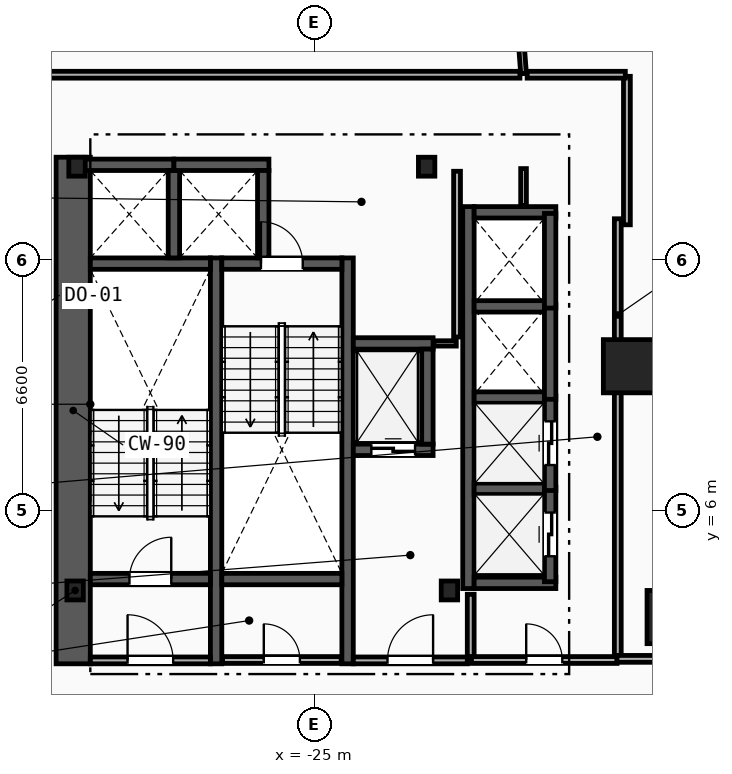
"""IFC4 building model, lengths in metres.
Left out: names, types, materials, properties, quantities, classifications, styles, units other than length and angle.
Written with IfcOpenShell. Run it as: python <this file> out.ifc"""

import sys

from ifc_helpers import new_model, si_unit, direction, frame, frame_2d, origin, origin_2d, place, context, subcontext, project, spatial, rectangle, i_section, extrude, element, fill, save


model = new_model("IFC4")
c1 = context("Model", 3, precision=1e-05, world=origin(), true_north=direction((0.0, 1.0)))
c2 = subcontext(c1, "Body", "Model", "MODEL_VIEW")
j1 = project(units=[si_unit("LENGTHUNIT", "METRE"), si_unit("PLANEANGLEUNIT", "RADIAN")], contexts=[c1])
p1 = place(None, origin())
s1 = spatial("IfcSite", under=j1, at=p1, CompositionType="ELEMENT")
p2 = place(p1, origin())
s2 = spatial("IfcBuilding", under=s1, at=p2, CompositionType="ELEMENT")
p3 = place(p2, frame((0.0, 0.0, 20.0)))
s3 = spatial("IfcBuildingStorey", under=s2, at=p3, CompositionType="ELEMENT", Elevation=20.0)
for number, where, z_axis, x_axis in (
    (1, (-31.3, 3.9, 0.0), (0.0, 0.0, 1.0), (1.0, 0.0, 0.0)),
    (2, (-21.45, 3.9, 0.0), (0.0, 0.0, 1.0), (1.0, 0.0, 0.0)),
    (3, (-22.05, 15.05, 0.0), (0.0, 0.0, 1.0), (1.0, 0.0, 0.0)),
    (4, (-31.25, 15.05, 0.0), (0.0, 0.0, 1.0), (1.0, 0.0, 0.0)),
):
    element("IfcColumn", number, at=place(p3, frame(where, z_axis=z_axis, x_axis=x_axis)), inside=s3, PredefinedType="COLUMN", context=c2, shape_type="SweptSolid", body=[
        extrude(i_section(OverallWidth=0.432, OverallDepth=0.498, WebThickness=0.056, FlangeThickness=0.089, FilletRadius=0.018, at=origin_2d()), origin(), (0.0, 0.0, 1.0), 4.0),
    ])
for number, where, z_axis, x_axis in (
    (5, (-15.55, 3.2, 0.0), (0.0, 0.0, 1.0), (1.0, 0.0, 0.0)),
    (6, (-16.7, 9.8, 0.0), (0.0, 0.0, 1.0), (1.0, 0.0, 0.0)),
):
    element("IfcColumn", number, at=place(p3, frame(where, z_axis=z_axis, x_axis=x_axis)), inside=s3, PredefinedType="COLUMN", context=c2, shape_type="SweptSolid", body=[
        extrude(rectangle(XDim=1.4, YDim=1.4, at=origin_2d()), origin(), (0.0, 0.0, 1.0), 4.0),
    ])
p4 = place(p3, frame((-31.35, 1.97, 0.0), z_axis=(0.0, 0.0, 1.0), x_axis=(0.0, 1.0, 0.0)))
e7 = element("IfcWall", 7, at=p4, inside=s3, PredefinedType="SHEAR", context=c2, shape_type="SweptSolid", body=[
    extrude(rectangle(XDim=13.33, YDim=0.9, at=frame_2d((6.665, 0.0))), origin(), (0.0, 0.0, 1.0), 3.7),
])
for number, where, z_axis, x_axis in (
    (8, (-27.59, 1.97, 0.0), (0.0, 0.0, 1.0), (0.0, 1.0, 0.0)),
    (9, (-24.13, 1.97, 0.0), (0.0, 0.0, 1.0), (0.0, 1.0, 0.0)),
):
    element("IfcWall", number, at=place(p3, frame(where, z_axis=z_axis, x_axis=x_axis)), inside=s3, PredefinedType="SHEAR", context=c2, shape_type="SweptSolid", body=[
        extrude(rectangle(XDim=10.68, YDim=0.3, at=frame_2d((5.34, 0.0))), origin(), (0.0, 0.0, 1.0), 3.7),
    ])
p5 = place(p3, frame((-30.9, 4.2, 0.0), z_axis=(0.0, 0.0, 1.0), x_axis=(1.0, 0.0, 0.0)))
e10 = element("IfcWall", 10, at=p5, inside=s3, PredefinedType="SHEAR", context=c2, shape_type="SweptSolid", body=[
    extrude(rectangle(XDim=3.16, YDim=0.3, at=frame_2d((1.58, 0.0))), origin(), (0.0, 0.0, 1.0), 3.7),
])
p6 = place(p5, frame((1.03, 0.0, 0.0)))
e11 = element("IfcOpeningElement", 11, at=p6, cuts=e10, PredefinedType="OPENING", context=c2, shape_type="SweptSolid", body=[
    extrude(rectangle(XDim=1.1, YDim=2.15, at=frame_2d((0.55, 1.075))), frame((0.0, 0.16, 0.0), z_axis=(0.0, -1.0, 0.0), x_axis=(1.0, 0.0, 0.0)), (0.0, 0.0, 1.0), 0.32),
])
p7 = place(p3, frame((-30.9, 12.5, 0.0), z_axis=(0.0, 0.0, 1.0), x_axis=(1.0, 0.0, 0.0)))
e12 = element("IfcWall", 12, at=p7, inside=s3, PredefinedType="SHEAR", context=c2, shape_type="SweptSolid", body=[
    extrude(rectangle(XDim=3.16, YDim=0.3, at=frame_2d((1.58, 0.0))), origin(), (0.0, 0.0, 1.0), 3.7),
])
p8 = place(p3, frame((-27.44, 12.5, 0.0), z_axis=(0.0, 0.0, 1.0), x_axis=(1.0, 0.0, 0.0)))
e13 = element("IfcWall", 13, at=p8, inside=s3, PredefinedType="SHEAR", context=c2, shape_type="SweptSolid", body=[
    extrude(rectangle(XDim=3.16, YDim=0.3, at=frame_2d((1.58, 0.0))), origin(), (0.0, 0.0, 1.0), 3.7),
])
p9 = place(p8, frame((1.03, 0.0, 0.0)))
e14 = element("IfcOpeningElement", 14, at=p9, cuts=e13, PredefinedType="OPENING", context=c2, shape_type="SweptSolid", body=[
    extrude(rectangle(XDim=1.1, YDim=2.15, at=frame_2d((0.55, 1.075))), frame((0.0, 0.16, 0.0), z_axis=(0.0, -1.0, 0.0), x_axis=(1.0, 0.0, 0.0)), (0.0, 0.0, 1.0), 0.32),
])
p10 = place(p3, frame((-27.44, 4.2, 0.0), z_axis=(0.0, 0.0, 1.0), x_axis=(1.0, 0.0, 0.0)))
e15 = element("IfcWall", 15, at=p10, inside=s3, PredefinedType="SHEAR", context=c2, shape_type="SweptSolid", body=[
    extrude(rectangle(XDim=3.16, YDim=0.3, at=frame_2d((1.58, 0.0))), origin(), (0.0, 0.0, 1.0), 3.7),
])
p11 = place(p3, frame((-20.89, 2.15, 0.0), z_axis=(0.0, 0.0, 1.0), x_axis=(0.0, 1.0, 0.0)))
e16 = element("IfcWall", 16, at=p11, inside=s3, PredefinedType="PARTITIONING", context=c2, shape_type="SweptSolid", body=[
    extrude(rectangle(XDim=1.65, YDim=0.18, at=frame_2d((0.825, 0.0))), origin(), (0.0, 0.0, 1.0), 3.7),
])
p12 = place(p3, frame((-23.98, 2.06, 0.0), z_axis=(0.0, 0.0, 1.0), x_axis=(1.0, 0.0, 0.0)))
e17 = element("IfcWall", 17, at=p12, inside=s3, PredefinedType="PARTITIONING", context=c2, shape_type="SweptSolid", body=[
    extrude(rectangle(XDim=3.0, YDim=0.18, at=frame_2d((1.5, 0.0))), origin(), (0.0, 0.0, 1.0), 3.7),
])
p13 = place(p12, frame((0.9, 0.0, 0.0)))
e18 = element("IfcOpeningElement", 18, at=p13, cuts=e17, PredefinedType="OPENING", context=c2, shape_type="SweptSolid", body=[
    extrude(rectangle(XDim=1.2, YDim=2.15, at=frame_2d((0.6, 1.075))), frame((0.0, 0.1, 0.0), z_axis=(0.0, -1.0, 0.0), x_axis=(1.0, 0.0, 0.0)), (0.0, 0.0, 1.0), 0.2),
])
p14 = place(p3, frame((-30.9, 2.06, 0.0), z_axis=(0.0, 0.0, 1.0), x_axis=(1.0, 0.0, 0.0)))
e19 = element("IfcWall", 19, at=p14, inside=s3, PredefinedType="PARTITIONING", context=c2, shape_type="SweptSolid", body=[
    extrude(rectangle(XDim=3.16, YDim=0.18, at=frame_2d((1.58, 0.0))), origin(), (0.0, 0.0, 1.0), 3.7),
])
p15 = place(p14, frame((0.98, 0.0, 0.0)))
e20 = element("IfcOpeningElement", 20, at=p15, cuts=e19, PredefinedType="OPENING", context=c2, shape_type="SweptSolid", body=[
    extrude(rectangle(XDim=1.2, YDim=2.15, at=frame_2d((0.6, 1.075))), frame((0.0, 0.1, 0.0), z_axis=(0.0, -1.0, 0.0), x_axis=(1.0, 0.0, 0.0)), (0.0, 0.0, 1.0), 0.2),
])
p16 = place(p3, frame((-23.98, 7.6, 0.0), z_axis=(0.0, 0.0, 1.0), x_axis=(1.0, 0.0, 0.0)))
e21 = element("IfcWall", 21, at=p16, inside=s3, PredefinedType="SHEAR", context=c2, shape_type="SweptSolid", body=[
    extrude(rectangle(XDim=2.1, YDim=0.3, at=frame_2d((1.05, 0.0))), origin(), (0.0, 0.0, 1.0), 3.7),
])
p17 = place(p16, frame((0.475, 0.0, 0.0)))
e22 = element("IfcOpeningElement", 22, at=p17, cuts=e21, PredefinedType="OPENING", context=c2, shape_type="SweptSolid", body=[
    extrude(rectangle(XDim=1.15, YDim=2.2, at=frame_2d((0.575, 1.1))), frame((0.0, 0.16, 0.0), z_axis=(0.0, -1.0, 0.0), x_axis=(1.0, 0.0, 0.0)), (0.0, 0.0, 1.0), 0.32),
])
p18 = place(p3, frame((-23.98, 10.4, 0.0), z_axis=(0.0, 0.0, 1.0), x_axis=(1.0, 0.0, 0.0)))
e23 = element("IfcWall", 23, at=p18, inside=s3, PredefinedType="SHEAR", context=c2, shape_type="SweptSolid", body=[
    extrude(rectangle(XDim=2.1, YDim=0.3, at=frame_2d((1.05, 0.0))), origin(), (0.0, 0.0, 1.0), 3.7),
])
for number, where, z_axis, x_axis in (
    (24, (-22.03, 7.75, 0.0), (0.0, 0.0, 1.0), (0.0, 1.0, 0.0)),
    (25, (-31.2, 15.1, 0.0), (0.0, 0.0, 1.0), (1.0, 0.0, 0.0)),
):
    element("IfcWall", number, at=place(p3, frame(where, z_axis=z_axis, x_axis=x_axis)), inside=s3, PredefinedType="SHEAR", context=c2, shape_type="SweptSolid", body=[
        extrude(rectangle(XDim=2.5, YDim=0.3, at=frame_2d((1.25, 0.0))), origin(), (0.0, 0.0, 1.0), 3.7),
    ])
p19 = place(p3, frame((-28.7, 12.65, 0.0), z_axis=(0.0, 0.0, 1.0), x_axis=(0.0, 1.0, 0.0)))
e26 = element("IfcWall", 26, at=p19, inside=s3, PredefinedType="SHEAR", context=c2, shape_type="SweptSolid", body=[
    extrude(rectangle(XDim=2.3, YDim=0.3, at=frame_2d((1.15, 0.0))), origin(), (0.0, 0.0, 1.0), 3.7),
])
p20 = place(p3, frame((-28.7, 15.1, 0.0), z_axis=(0.0, 0.0, 1.0), x_axis=(1.0, 0.0, 0.0)))
e27 = element("IfcWall", 27, at=p20, inside=s3, PredefinedType="SHEAR", context=c2, shape_type="SweptSolid", body=[
    extrude(rectangle(XDim=2.5, YDim=0.3, at=frame_2d((1.25, 0.0))), origin(), (0.0, 0.0, 1.0), 3.7),
])
p21 = place(p3, frame((-26.35, 12.65, 0.0), z_axis=(0.0, 0.0, 1.0), x_axis=(0.0, 1.0, 0.0)))
e28 = element("IfcWall", 28, at=p21, inside=s3, PredefinedType="SHEAR", context=c2, shape_type="SweptSolid", body=[
    extrude(rectangle(XDim=2.3, YDim=0.3, at=frame_2d((1.15, 0.0))), origin(), (0.0, 0.0, 1.0), 3.7),
])
p22 = place(p3, frame((-20.95, 3.95, 0.0), z_axis=(0.0, 0.0, 1.0), x_axis=(0.0, 1.0, 0.0)))
e29 = element("IfcWall", 29, at=p22, inside=s3, PredefinedType="SHEAR", context=c2, shape_type="SweptSolid", body=[
    extrude(rectangle(XDim=10.05, YDim=0.3, at=frame_2d((5.025, 0.0))), origin(), (0.0, 0.0, 1.0), 3.7),
])
for number, where, z_axis, x_axis in (
    (30, (-20.8, 4.1, 0.0), (0.0, 0.0, 1.0), (1.0, 0.0, 0.0)),
    (31, (-20.8, 13.85, 0.0), (0.0, 0.0, 1.0), (1.0, 0.0, 0.0)),
):
    element("IfcWall", number, at=place(p3, frame(where, z_axis=z_axis, x_axis=x_axis)), inside=s3, PredefinedType="SHEAR", context=c2, shape_type="SweptSolid", body=[
        extrude(rectangle(XDim=2.15, YDim=0.3, at=frame_2d((1.075, 0.0))), origin(), (0.0, 0.0, 1.0), 3.7),
    ])
for number, where, z_axis, x_axis in (
    (32, (-20.8, 6.575, 0.0), (0.0, 0.0, 1.0), (1.0, 0.0, 0.0)),
    (33, (-20.8, 8.975, 0.0), (0.0, 0.0, 1.0), (1.0, 0.0, 0.0)),
    (34, (-20.8, 11.375, 0.0), (0.0, 0.0, 1.0), (1.0, 0.0, 0.0)),
):
    element("IfcWall", number, at=place(p3, frame(where, z_axis=z_axis, x_axis=x_axis)), inside=s3, PredefinedType="SHEAR", context=c2, shape_type="SweptSolid", body=[
        extrude(rectangle(XDim=1.85, YDim=0.3, at=frame_2d((0.925, 0.0))), origin(), (0.0, 0.0, 1.0), 3.7),
    ])
p23 = place(p3, frame((-18.8, 4.13, 0.0), z_axis=(0.0, 0.0, 1.0), x_axis=(0.0, 1.0, 0.0)))
e35 = element("IfcWall", 35, at=p23, inside=s3, PredefinedType="SHEAR", context=c2, shape_type="SweptSolid", body=[
    extrude(rectangle(XDim=2.49, YDim=0.3, at=frame_2d((1.245, 0.0))), origin(), (0.0, 0.0, 1.0), 3.7),
])
p24 = place(p23, frame((0.67, 0.0, 0.0)))
e36 = element("IfcOpeningElement", 36, at=p24, cuts=e35, PredefinedType="OPENING", context=c2, shape_type="SweptSolid", body=[
    extrude(rectangle(XDim=1.15, YDim=2.2, at=frame_2d((0.575, 1.1))), frame((0.0, 0.16, 0.0), z_axis=(0.0, -1.0, 0.0), x_axis=(1.0, 0.0, 0.0)), (0.0, 0.0, 1.0), 0.32),
])
p25 = place(p3, frame((-18.8, 6.53, 0.0), z_axis=(0.0, 0.0, 1.0), x_axis=(0.0, 1.0, 0.0)))
e37 = element("IfcWall", 37, at=p25, inside=s3, PredefinedType="SHEAR", context=c2, shape_type="SweptSolid", body=[
    extrude(rectangle(XDim=2.49, YDim=0.3, at=frame_2d((1.245, 0.0))), origin(), (0.0, 0.0, 1.0), 3.7),
])
p26 = place(p25, frame((0.67, 0.0, 0.0)))
e38 = element("IfcOpeningElement", 38, at=p26, cuts=e37, PredefinedType="OPENING", context=c2, shape_type="SweptSolid", body=[
    extrude(rectangle(XDim=1.15, YDim=2.2, at=frame_2d((0.575, 1.1))), frame((0.0, 0.16, 0.0), z_axis=(0.0, -1.0, 0.0), x_axis=(1.0, 0.0, 0.0)), (0.0, 0.0, 1.0), 0.32),
])
for number, where, z_axis, x_axis in (
    (39, (-18.8, 8.93, 0.0), (0.0, 0.0, 1.0), (0.0, 1.0, 0.0)),
    (40, (-18.8, 11.33, 0.0), (0.0, 0.0, 1.0), (0.0, 1.0, 0.0)),
):
    element("IfcWall", number, at=place(p3, frame(where, z_axis=z_axis, x_axis=x_axis)), inside=s3, PredefinedType="SHEAR", context=c2, shape_type="SweptSolid", body=[
        extrude(rectangle(XDim=2.49, YDim=0.3, at=frame_2d((1.245, 0.0))), origin(), (0.0, 0.0, 1.0), 3.7),
    ])
p27 = place(p3, frame((-17.02, 2.17, 0.0), z_axis=(0.0, 0.0, 1.0), x_axis=(0.0, 1.0, 0.0)))
e41 = element("IfcWall", 41, at=p27, inside=s3, PredefinedType="PARTITIONING", context=c2, shape_type="SweptSolid", body=[
    extrude(rectangle(XDim=11.51, YDim=0.18, at=frame_2d((5.755, 0.0))), origin(), (0.0, 0.0, 1.0), 1.9),
])
p28 = place(p3, frame((-20.87, 2.07, 0.0), z_axis=(0.0, 0.0, 1.0), x_axis=(1.0, 0.0, 0.0)))
e42 = element("IfcWall", 42, at=p28, inside=s3, PredefinedType="PARTITIONING", context=c2, shape_type="SweptSolid", body=[
    extrude(rectangle(XDim=3.83, YDim=0.18, at=frame_2d((1.915, 0.0))), origin(), (0.0, 0.0, 1.0), 3.7),
])
p29 = place(p28, frame((1.44, 0.0, 0.0)))
e43 = element("IfcOpeningElement", 43, at=p29, cuts=e42, PredefinedType="OPENING", context=c2, shape_type="SweptSolid", body=[
    extrude(rectangle(XDim=0.95, YDim=2.1, at=frame_2d((0.475, 1.05))), frame((0.0, 0.1, 0.0), z_axis=(0.0, -1.0, 0.0), x_axis=(1.0, 0.0, 0.0)), (0.0, 0.0, 1.0), 0.2),
])
p30 = place(p3, frame((-21.86, 10.4, 0.0), z_axis=(0.0, 0.0, 1.0), x_axis=(1.0, 0.0, 0.0)))
e44 = element("IfcWall", 44, at=p30, inside=s3, PredefinedType="PARTITIONING", context=c2, shape_type="SweptSolid", body=[
    extrude(rectangle(XDim=0.59, YDim=0.14, at=frame_2d((0.295, 0.0))), origin(), (0.0, 0.0, 1.0), 3.7),
])
p31 = place(p3, frame((-21.25, 10.57, 0.0), z_axis=(0.0, 0.0, 1.0), x_axis=(0.0, 1.0, 0.0)))
e45 = element("IfcWall", 45, at=p31, inside=s3, PredefinedType="PARTITIONING", context=c2, shape_type="SweptSolid", body=[
    extrude(rectangle(XDim=4.36, YDim=0.18, at=frame_2d((2.18, 0.0))), origin(), (0.0, 0.0, 1.0), 3.7),
])
p32 = place(p3, frame((-27.42, 2.07, 0.0), z_axis=(0.0, 0.0, 1.0), x_axis=(1.0, 0.0, 0.0)))
e46 = element("IfcWall", 46, at=p32, inside=s3, PredefinedType="PARTITIONING", context=c2, shape_type="SweptSolid", body=[
    extrude(rectangle(XDim=3.12, YDim=0.18, at=frame_2d((1.56, 0.0))), origin(), (0.0, 0.0, 1.0), 3.7),
])
p33 = place(p32, frame((1.085, 0.0, 0.0)))
e47 = element("IfcOpeningElement", 47, at=p33, cuts=e46, PredefinedType="OPENING", context=c2, shape_type="SweptSolid", body=[
    extrude(rectangle(XDim=0.95, YDim=2.1, at=frame_2d((0.475, 1.05))), frame((0.0, 0.1, 0.0), z_axis=(0.0, -1.0, 0.0), x_axis=(1.0, 0.0, 0.0)), (0.0, 0.0, 1.0), 0.2),
])
p34 = place(p3, frame((-19.5, 14.03, 0.0), z_axis=(0.0, 0.0, 1.0), x_axis=(0.0, 1.0, 0.0)))
e48 = element("IfcWall", 48, at=p34, inside=s3, PredefinedType="PARTITIONING", context=c2, shape_type="SweptSolid", body=[
    extrude(rectangle(XDim=0.97, YDim=0.15, at=frame_2d((0.485, 0.0))), origin(), (0.0, 0.0, 1.0), 3.7),
])
p35 = place(p3, frame((-19.5, 17.5, 0.0), z_axis=(0.0, 0.0, 1.0), x_axis=(-0.074269014628, 0.997238243082, 0.0)))
e49 = element("IfcWall", 49, at=p35, inside=s3, PredefinedType="PARTITIONING", context=c2, shape_type="SweptSolid", body=[
    extrude(rectangle(XDim=10.637, YDim=0.15, at=frame_2d((5.319, 0.0))), origin(), (0.0, 0.0, 1.0), 3.7),
])
p36 = place(p35, frame((4.619, 0.0, 1.05)))
e50 = element("IfcOpeningElement", 50, at=p36, cuts=e49, PredefinedType="OPENING", context=c2, shape_type="SweptSolid", body=[
    extrude(rectangle(XDim=1.4, YDim=1.5, at=frame_2d((0.7, 0.75))), frame((0.0, 0.085, 0.0), z_axis=(0.0, -1.0, 0.0), x_axis=(1.0, 0.0, 0.0)), (0.0, 0.0, 1.0), 0.17),
])
p37 = place(p3, frame((-19.595, 17.47, 0.0), z_axis=(0.0, 0.0, 1.0), x_axis=(-1.0, 0.0, 0.0)))
e51 = element("IfcWall", 51, at=p37, inside=s3, PredefinedType="PARTITIONING", context=c2, shape_type="SweptSolid", body=[
    extrude(rectangle(XDim=14.033, YDim=0.18, at=frame_2d((7.017, 0.0))), origin(), (0.0, 0.0, 1.0), 1.9),
])
p38 = place(p3, frame((-0.095, 2.1, 0.0), z_axis=(0.0, 0.0, 1.0), x_axis=(-1.0, 0.0, 0.0)))
e52 = element("IfcWall", 52, at=p38, inside=s3, PredefinedType="PARTITIONING", context=c2, shape_type="SweptSolid", body=[
    extrude(rectangle(XDim=16.945, YDim=0.18, at=frame_2d((8.473, 0.0))), origin(), (0.0, 0.0, 1.0), 2.922),
])
p39 = place(p38, frame((7.673, 0.0, 0.0)))
e53 = element("IfcOpeningElement", 53, at=p39, cuts=e52, PredefinedType="OPENING", context=c2, shape_type="SweptSolid", body=[
    extrude(rectangle(XDim=1.6, YDim=2.2, at=frame_2d((0.8, 1.1))), frame((0.0, 0.1, 0.0), z_axis=(0.0, -1.0, 0.0), x_axis=(1.0, 0.0, 0.0)), (0.0, 0.0, 1.0), 0.2),
])
p40 = place(p3, frame((-16.78, 13.521, 0.0), z_axis=(0.0, 0.0, 1.0), x_axis=(0.0, 1.0, 0.0)))
e54 = element("IfcWall", 54, at=p40, inside=s3, PredefinedType="PARTITIONING", context=c2, shape_type="SweptSolid", body=[
    extrude(rectangle(XDim=3.907, YDim=0.18, at=frame_2d((1.954, 0.0))), origin(), (0.0, 0.0, 1.0), 3.7),
])
p41 = place(p3, frame((-16.822, 17.47, 0.0), z_axis=(0.0, 0.0, 1.0), x_axis=(-1.0, 0.0, 0.0)))
e55 = element("IfcWall", 55, at=p41, inside=s3, PredefinedType="PARTITIONING", context=c2, shape_type="SweptSolid", body=[
    extrude(rectangle(XDim=2.583, YDim=0.18, at=frame_2d((1.292, 0.0))), origin(), (0.0, 0.0, 1.0), 3.7),
])
p42 = place(p6, origin())
e56 = element("IfcDoor", 56, at=p42, inside=s3, OperationType="SINGLE_SWING_RIGHT", PredefinedType="DOOR", context=c2, shape_type="SweptSolid", body=[
    extrude(rectangle(XDim=1.1, YDim=2.15, at=frame_2d((0.55, 1.075))), frame((0.0, 0.025, 0.0), z_axis=(0.0, -1.0, 0.0), x_axis=(1.0, 0.0, 0.0)), (0.0, 0.0, 1.0), 0.05),
])
fill(e11, e56)
p43 = place(p9, origin())
e57 = element("IfcDoor", 57, at=p43, inside=s3, OperationType="SINGLE_SWING_LEFT", PredefinedType="DOOR", context=c2, shape_type="SweptSolid", body=[
    extrude(rectangle(XDim=1.1, YDim=2.15, at=frame_2d((0.55, 1.075))), frame((0.0, 0.025, 0.0), z_axis=(0.0, -1.0, 0.0), x_axis=(1.0, 0.0, 0.0)), (0.0, 0.0, 1.0), 0.05),
])
fill(e14, e57)
p44 = place(p13, origin())
e58 = element("IfcDoor", 58, at=p44, inside=s3, OperationType="SINGLE_SWING_RIGHT", PredefinedType="DOOR", context=c2, shape_type="SweptSolid", body=[
    extrude(rectangle(XDim=1.2, YDim=2.15, at=frame_2d((0.6, 1.075))), frame((0.0, 0.025, 0.0), z_axis=(0.0, -1.0, 0.0), x_axis=(1.0, 0.0, 0.0)), (0.0, 0.0, 1.0), 0.05),
])
fill(e18, e58)
p45 = place(p15, origin())
e59 = element("IfcDoor", 59, at=p45, inside=s3, OperationType="SINGLE_SWING_LEFT", PredefinedType="DOOR", context=c2, shape_type="SweptSolid", body=[
    extrude(rectangle(XDim=1.2, YDim=2.15, at=frame_2d((0.6, 1.075))), frame((0.0, 0.025, 0.0), z_axis=(0.0, -1.0, 0.0), x_axis=(1.0, 0.0, 0.0)), (0.0, 0.0, 1.0), 0.05),
])
fill(e20, e59)
p46 = place(p17, origin())
e60 = element("IfcDoor", 60, at=p46, inside=s3, OperationType="SLIDING_TO_LEFT", PredefinedType="TRAPDOOR", context=c2, shape_type="SweptSolid", body=[
    extrude(rectangle(XDim=1.15, YDim=2.2, at=frame_2d((0.575, 1.1))), frame((0.0, 0.025, 0.0), z_axis=(0.0, -1.0, 0.0), x_axis=(1.0, 0.0, 0.0)), (0.0, 0.0, 1.0), 0.05),
])
fill(e22, e60)
p47 = place(p24, origin())
e61 = element("IfcDoor", 61, at=p47, inside=s3, OperationType="SLIDING_TO_LEFT", PredefinedType="TRAPDOOR", context=c2, shape_type="SweptSolid", body=[
    extrude(rectangle(XDim=1.15, YDim=2.2, at=frame_2d((0.575, 1.1))), frame((0.0, 0.025, 0.0), z_axis=(0.0, -1.0, 0.0), x_axis=(1.0, 0.0, 0.0)), (0.0, 0.0, 1.0), 0.05),
])
fill(e36, e61)
p48 = place(p26, origin())
e62 = element("IfcDoor", 62, at=p48, inside=s3, OperationType="SLIDING_TO_LEFT", PredefinedType="TRAPDOOR", context=c2, shape_type="SweptSolid", body=[
    extrude(rectangle(XDim=1.15, YDim=2.2, at=frame_2d((0.575, 1.1))), frame((0.0, 0.025, 0.0), z_axis=(0.0, -1.0, 0.0), x_axis=(1.0, 0.0, 0.0)), (0.0, 0.0, 1.0), 0.05),
])
fill(e38, e62)
p49 = place(p29, origin())
e63 = element("IfcDoor", 63, at=p49, inside=s3, OperationType="SINGLE_SWING_LEFT", PredefinedType="DOOR", context=c2, shape_type="SweptSolid", body=[
    extrude(rectangle(XDim=0.95, YDim=2.1, at=frame_2d((0.475, 1.05))), frame((0.0, 0.025, 0.0), z_axis=(0.0, -1.0, 0.0), x_axis=(1.0, 0.0, 0.0)), (0.0, 0.0, 1.0), 0.05),
])
fill(e43, e63)
p50 = place(p33, origin())
e64 = element("IfcDoor", 64, at=p50, inside=s3, OperationType="SINGLE_SWING_LEFT", PredefinedType="DOOR", context=c2, shape_type="SweptSolid", body=[
    extrude(rectangle(XDim=0.95, YDim=2.1, at=frame_2d((0.475, 1.05))), frame((0.0, 0.025, 0.0), z_axis=(0.0, -1.0, 0.0), x_axis=(1.0, 0.0, 0.0)), (0.0, 0.0, 1.0), 0.05),
])
fill(e47, e64)
save(model, sys.argv[1])
